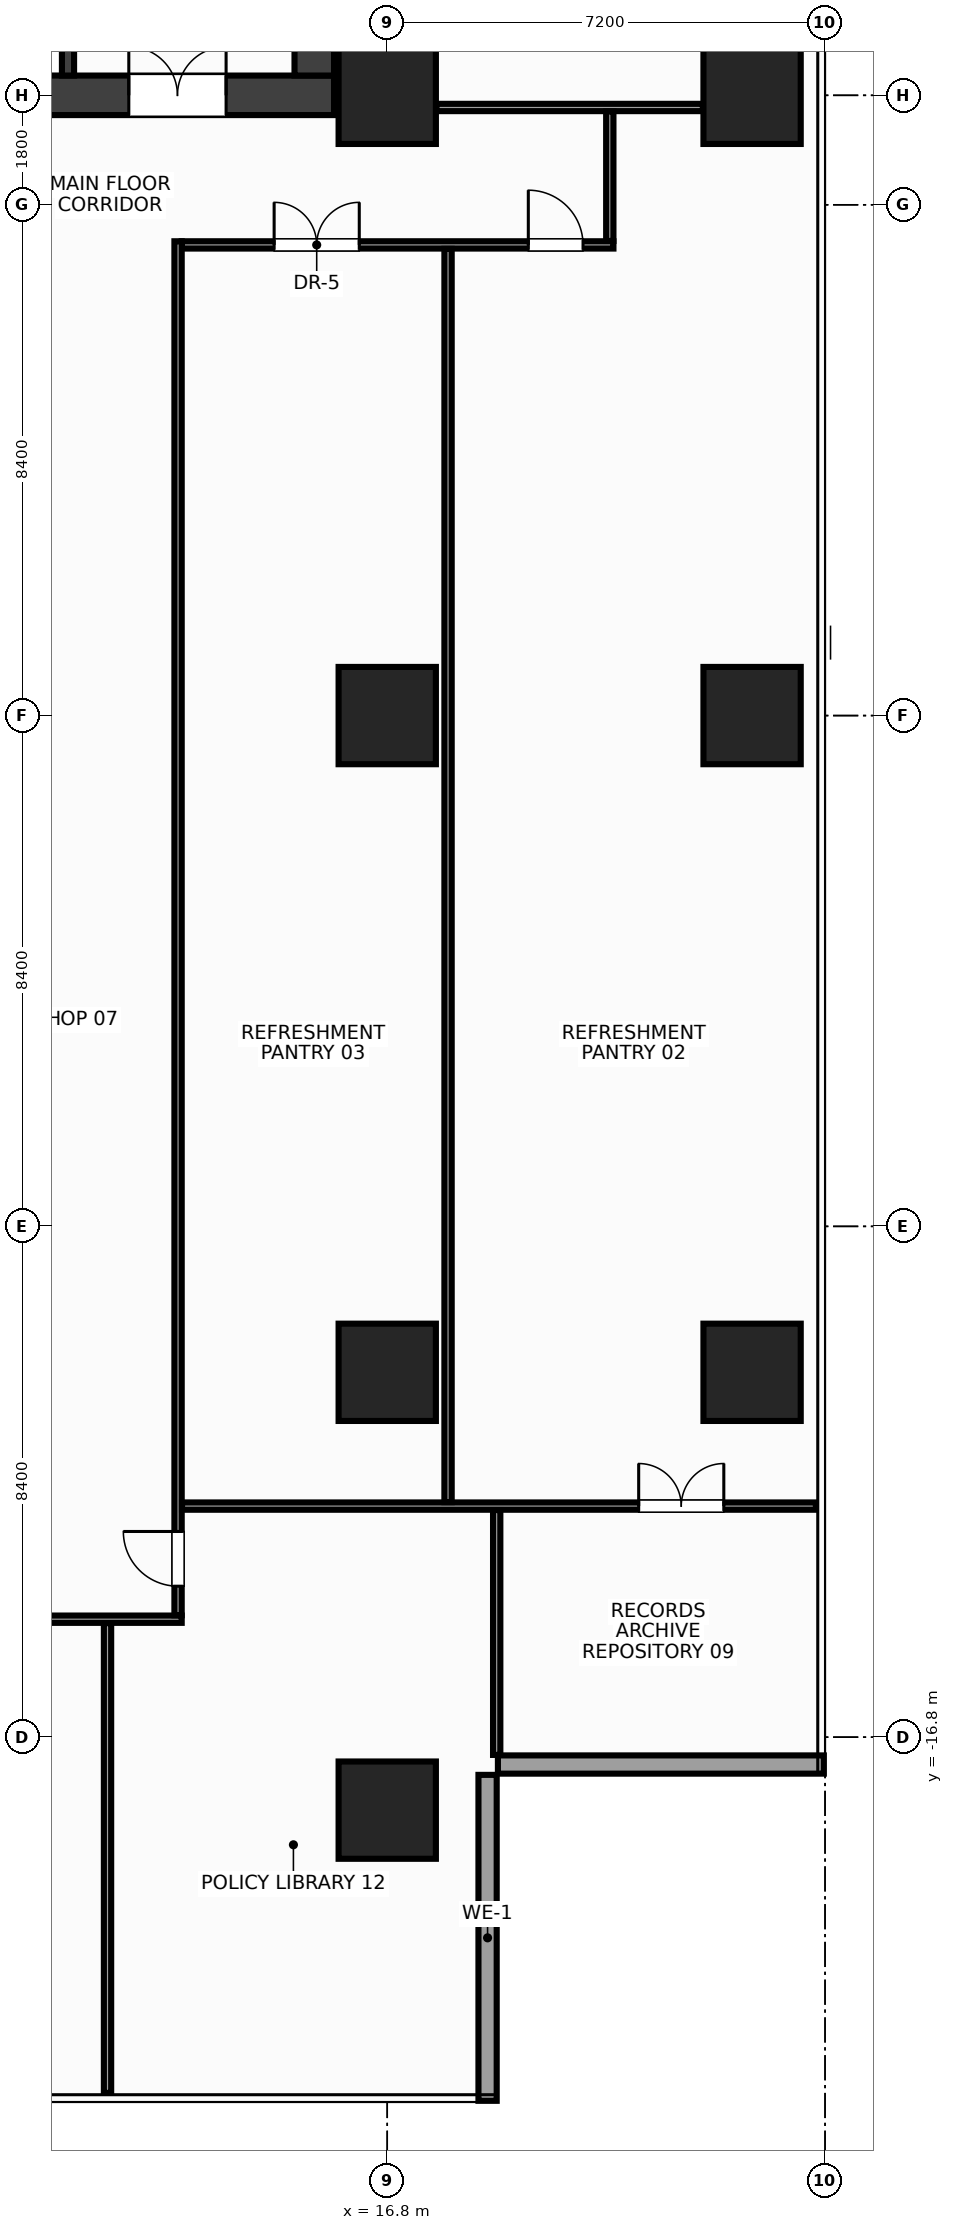
"""IFC4 building model, lengths in metres.
Left out: names, types, materials, properties, quantities, classifications, styles, units other than length and angle.
Written with IfcOpenShell. Run it as: python <this file> out.ifc"""

import sys

from ifc_helpers import new_model, si_unit, direction, frame, frame_2d, origin, origin_2d, place, context, subcontext, project, spatial, rectangle, extrude, source, transform, mapped, element, fill, save


model = new_model("IFC4")
c1 = context("Model", 3, precision=1e-05, world=origin(), true_north=direction((0.0, 1.0)))
c2 = subcontext(c1, "Body", "Model", "MODEL_VIEW")
j1 = project(units=[si_unit("LENGTHUNIT", "METRE"), si_unit("PLANEANGLEUNIT", "RADIAN")], contexts=[c1])
p1 = place(None, origin())
s1 = spatial("IfcSite", under=j1, at=p1, CompositionType="ELEMENT")
p2 = place(p1, origin())
s2 = spatial("IfcBuilding", under=s1, at=p2, CompositionType="ELEMENT")
p3 = place(p2, frame((0.0, 0.0, 185.6)))
s3 = spatial("IfcBuildingStorey", under=s2, at=p3, CompositionType="ELEMENT", Elevation=185.6)
m1 = source(origin(), c2, "Body", "SweptSolid", [
    extrude(rectangle(XDim=31.85, YDim=0.65, at=frame_2d((15.925, 0.0))), origin(), (0.0, 0.0, 1.0), 3.6),
])
p4 = place(p3, frame((-15.925, 10.2, 0.0), z_axis=(0.0, 0.0, 1.0), x_axis=(1.0, 0.0, 0.0)))
e1 = element("IfcWall", 1, at=p4, inside=s3, PredefinedType="SHEAR", context=c2, shape_type="MappedRepresentation", body=[
    mapped(m1, transform((0.0, 0.0, 0.0), x_axis=(1.0, 0.0, 0.0), y_axis=(0.0, 1.0, 0.0), z_axis=(0.0, 0.0, 1.0), scale=1.0)),
])
p5 = place(p4, frame((1.775, 0.0, 0.0)))
e2 = element("IfcOpeningElement", 2, at=p5, cuts=e1, PredefinedType="OPENING", context=c2, shape_type="SweptSolid", body=[
    extrude(rectangle(XDim=1.6, YDim=2.15, at=frame_2d((0.8, 1.075))), frame((0.0, 0.337, 0.0), z_axis=(0.0, -1.0, 0.0), x_axis=(1.0, 0.0, 0.0)), (0.0, 0.0, 1.0), 0.674),
])
p6 = place(p4, frame((28.475, 0.0, 0.0)))
e3 = element("IfcOpeningElement", 3, at=p6, cuts=e1, PredefinedType="OPENING", context=c2, shape_type="SweptSolid", body=[
    extrude(rectangle(XDim=1.6, YDim=2.15, at=frame_2d((0.8, 1.075))), frame((0.0, 0.337, 0.0), z_axis=(0.0, -1.0, 0.0), x_axis=(1.0, 0.0, 0.0)), (0.0, 0.0, 1.0), 0.674),
])
p7 = place(p4, frame((15.175, 0.0, 0.0)))
e4 = element("IfcOpeningElement", 4, at=p7, cuts=e1, PredefinedType="OPENING", context=c2, shape_type="SweptSolid", body=[
    extrude(rectangle(XDim=1.5, YDim=2.2, at=frame_2d((0.75, 1.1))), frame((0.0, 0.337, 0.0), z_axis=(0.0, -1.0, 0.0), x_axis=(1.0, 0.0, 0.0)), (0.0, 0.0, 1.0), 0.674),
])
m2 = source(origin(), c2, "Body", "SweptSolid", [
    extrude(rectangle(XDim=12.95, YDim=0.65, at=frame_2d((6.475, 0.0))), origin(), (0.0, 0.0, 1.0), 3.6),
])
p8 = place(p3, frame((15.6, 10.525, 0.0), z_axis=(0.0, 0.0, 1.0), x_axis=(0.0, 1.0, 0.0)))
e5 = element("IfcWall", 5, at=p8, inside=s3, PredefinedType="SHEAR", context=c2, shape_type="MappedRepresentation", body=[
    mapped(m2, transform((0.0, 0.0, 0.0), x_axis=(1.0, 0.0, 0.0), y_axis=(0.0, 1.0, 0.0), z_axis=(0.0, 0.0, 1.0), scale=1.0)),
])
m3 = source(origin(), c2, "Body", "SweptSolid", [
    extrude(rectangle(XDim=3.125, YDim=0.2, at=frame_2d((1.562, 0.0))), origin(), (0.0, 0.0, 1.0), 3.6),
])
p9 = place(p3, frame((11.55, 10.525, 0.0), z_axis=(0.0, 0.0, 1.0), x_axis=(0.0, 1.0, 0.0)))
e6 = element("IfcWall", 6, at=p9, inside=s3, PredefinedType="SHEAR", context=c2, shape_type="MappedRepresentation", body=[
    mapped(m3, transform((0.0, 0.0, 0.0), x_axis=(1.0, 0.0, 0.0), y_axis=(0.0, 1.0, 0.0), z_axis=(0.0, 0.0, 1.0), scale=1.0)),
])
p10 = place(p9, frame((0.9, 0.0, 0.0)))
e7 = element("IfcOpeningElement", 7, at=p10, cuts=e6, PredefinedType="OPENING", context=c2, shape_type="SweptSolid", body=[
    extrude(rectangle(XDim=1.1, YDim=2.15, at=frame_2d((0.55, 1.075))), frame((0.0, 0.112, 0.0), z_axis=(0.0, -1.0, 0.0), x_axis=(1.0, 0.0, 0.0)), (0.0, 0.0, 1.0), 0.224),
])
m4 = source(origin(), c2, "Body", "SweptSolid", [
    extrude(rectangle(XDim=1.6, YDim=1.6, at=origin_2d()), origin(), (0.0, 0.0, 1.0), 3.6),
])
for number, where, z_axis, x_axis in (
    (8, (16.8, -18.0, 0.0), (0.0, 0.0, 1.0), (1.0, 0.0, 0.0)),
    (9, (16.8, -10.8, 0.0), (0.0, 0.0, 1.0), (1.0, 0.0, 0.0)),
    (10, (16.8, 0.0, 0.0), (0.0, 0.0, 1.0), (1.0, 0.0, 0.0)),
    (11, (16.8, 10.2, 0.0), (0.0, 0.0, 1.0), (1.0, 0.0, 0.0)),
    (12, (22.8, -10.8, 0.0), (0.0, 0.0, 1.0), (1.0, 0.0, 0.0)),
    (13, (22.8, 0.0, 0.0), (0.0, 0.0, 1.0), (1.0, 0.0, 0.0)),
    (14, (22.8, 10.2, 0.0), (0.0, 0.0, 1.0), (1.0, 0.0, 0.0)),
):
    element("IfcColumn", number, at=place(p3, frame(where, z_axis=z_axis, x_axis=x_axis)), inside=s3, PredefinedType="COLUMN", context=c2, shape_type="MappedRepresentation", body=[
        mapped(m4, transform((0.0, 0.0, 0.0), x_axis=(1.0, 0.0, 0.0), y_axis=(0.0, 1.0, 0.0), z_axis=(0.0, 0.0, 1.0), scale=1.0)),
    ])
m5 = source(origin(), c2, "Body", "SweptSolid", [
    extrude(rectangle(XDim=5.36, YDim=0.3, at=frame_2d((2.68, 0.0))), origin(), (0.0, 0.0, 1.0), 2.68),
])
p11 = place(p3, frame((18.45, -22.78, 0.0), z_axis=(0.0, 0.0, 1.0), x_axis=(0.0, 1.0, 0.0)))
e15 = element("IfcWall", 15, at=p11, inside=s3, PredefinedType="STANDARD", context=c2, shape_type="MappedRepresentation", body=[
    mapped(m5, transform((0.0, 0.0, 0.0), x_axis=(1.0, 0.0, 0.0), y_axis=(0.0, 1.0, 0.0), z_axis=(0.0, 0.0, 1.0), scale=1.0)),
])
m6 = source(origin(), c2, "Body", "SweptSolid", [
    extrude(rectangle(XDim=5.36, YDim=0.3, at=frame_2d((2.68, 0.0))), origin(), (0.0, 0.0, 1.0), 2.68),
])
p12 = place(p3, frame((18.62, -17.25, 0.0), z_axis=(0.0, 0.0, 1.0), x_axis=(1.0, 0.0, 0.0)))
e16 = element("IfcWall", 16, at=p12, inside=s3, PredefinedType="STANDARD", context=c2, shape_type="MappedRepresentation", body=[
    mapped(m6, transform((0.0, 0.0, 0.0), x_axis=(1.0, 0.0, 0.0), y_axis=(0.0, 1.0, 0.0), z_axis=(0.0, 0.0, 1.0), scale=1.0)),
])
m7 = source(origin(), c2, "Body", "SweptSolid", [
    extrude(rectangle(XDim=4.38, YDim=0.12, at=frame_2d((2.19, 0.0))), origin(), (0.0, 0.0, 1.0), 2.835),
])
p13 = place(p3, frame((17.61, 10.0, 0.0), z_axis=(0.0, 0.0, 1.0), x_axis=(1.0, 0.0, 0.0)))
e17 = element("IfcWall", 17, at=p13, inside=s3, PredefinedType="PARTITIONING", context=c2, shape_type="MappedRepresentation", body=[
    mapped(m7, transform((0.0, 0.0, 0.0), x_axis=(1.0, 0.0, 0.0), y_axis=(0.0, 1.0, 0.0), z_axis=(0.0, 0.0, 1.0), scale=1.0)),
])
m8 = source(origin(), c2, "Body", "SweptSolid", [
    extrude(rectangle(XDim=7.1, YDim=0.12, at=frame_2d((3.55, 0.0))), origin(), (0.0, 0.0, 1.0), 2.685),
])
p14 = place(p3, frame((13.42, 7.74, 0.0), z_axis=(0.0, 0.0, 1.0), x_axis=(1.0, 0.0, 0.0)))
e18 = element("IfcWall", 18, at=p14, inside=s3, PredefinedType="PARTITIONING", context=c2, shape_type="MappedRepresentation", body=[
    mapped(m8, transform((0.0, 0.0, 0.0), x_axis=(1.0, 0.0, 0.0), y_axis=(0.0, 1.0, 0.0), z_axis=(0.0, 0.0, 1.0), scale=1.0)),
])
p15 = place(p14, frame((5.7, 0.0, 0.0)))
e19 = element("IfcOpeningElement", 19, at=p15, cuts=e18, PredefinedType="OPENING", context=c2, shape_type="SweptSolid", body=[
    extrude(rectangle(XDim=0.9, YDim=2.15, at=frame_2d((0.45, 1.075))), frame((0.0, 0.072, 0.0), z_axis=(0.0, -1.0, 0.0), x_axis=(1.0, 0.0, 0.0)), (0.0, 0.0, 1.0), 0.144),
])
p16 = place(p14, frame((1.52, 0.0, 0.0)))
e20 = element("IfcOpeningElement", 20, at=p16, cuts=e18, PredefinedType="OPENING", context=c2, shape_type="SweptSolid", body=[
    extrude(rectangle(XDim=1.4, YDim=2.2, at=frame_2d((0.7, 1.1))), frame((0.0, 0.072, 0.0), z_axis=(0.0, -1.0, 0.0), x_axis=(1.0, 0.0, 0.0)), (0.0, 0.0, 1.0), 0.144),
])
m9 = source(origin(), c2, "Body", "SweptSolid", [
    extrude(rectangle(XDim=2.34, YDim=0.12, at=frame_2d((1.17, 0.0))), origin(), (0.0, 0.0, 1.0), 3.3),
])
p17 = place(p3, frame((11.08, -14.86, 0.0), z_axis=(0.0, 0.0, 1.0), x_axis=(1.0, 0.0, 0.0)))
e21 = element("IfcWall", 21, at=p17, inside=s3, PredefinedType="PARTITIONING", context=c2, shape_type="MappedRepresentation", body=[
    mapped(m9, transform((0.0, 0.0, 0.0), x_axis=(1.0, 0.0, 0.0), y_axis=(0.0, 1.0, 0.0), z_axis=(0.0, 0.0, 1.0), scale=1.0)),
])
m10 = source(origin(), c2, "Body", "SweptSolid", [
    extrude(rectangle(XDim=2.13, YDim=0.12, at=frame_2d((1.065, 0.0))), origin(), (0.0, 0.0, 1.0), 3.3),
])
p18 = place(p3, frame((20.46, 7.805, 0.0), z_axis=(0.0, 0.0, 1.0), x_axis=(0.0, 1.0, 0.0)))
e22 = element("IfcWall", 22, at=p18, inside=s3, PredefinedType="PARTITIONING", context=c2, shape_type="MappedRepresentation", body=[
    mapped(m10, transform((0.0, 0.0, 0.0), x_axis=(1.0, 0.0, 0.0), y_axis=(0.0, 1.0, 0.0), z_axis=(0.0, 0.0, 1.0), scale=1.0)),
])
m11 = source(origin(), c2, "Body", "SweptSolid", [
    extrude(rectangle(XDim=22.595, YDim=0.12, at=frame_2d((11.297, 0.0))), origin(), (0.0, 0.0, 1.0), 2.585),
])
p19 = place(p3, frame((13.36, -14.795, 0.0), z_axis=(0.0, 0.0, 1.0), x_axis=(0.0, 1.0, 0.0)))
e23 = element("IfcWall", 23, at=p19, inside=s3, PredefinedType="PARTITIONING", context=c2, shape_type="MappedRepresentation", body=[
    mapped(m11, transform((0.0, 0.0, 0.0), x_axis=(1.0, 0.0, 0.0), y_axis=(0.0, 1.0, 0.0), z_axis=(0.0, 0.0, 1.0), scale=1.0)),
])
p20 = place(p19, frame((0.478, 0.0, 0.0)))
e24 = element("IfcOpeningElement", 24, at=p20, cuts=e23, PredefinedType="OPENING", context=c2, shape_type="SweptSolid", body=[
    extrude(rectangle(XDim=0.9, YDim=2.15, at=frame_2d((0.45, 1.075))), frame((0.0, 0.072, 0.0), z_axis=(0.0, -1.0, 0.0), x_axis=(1.0, 0.0, 0.0)), (0.0, 0.0, 1.0), 0.144),
])
m12 = source(origin(), c2, "Body", "SweptSolid", [
    extrude(rectangle(XDim=10.425, YDim=0.12, at=frame_2d((5.212, 0.0))), origin(), (0.0, 0.0, 1.0), 2.885),
])
p21 = place(p3, frame((13.425, -13.0, 0.0), z_axis=(0.0, 0.0, 1.0), x_axis=(1.0, 0.0, 0.0)))
e25 = element("IfcWall", 25, at=p21, inside=s3, PredefinedType="PARTITIONING", context=c2, shape_type="MappedRepresentation", body=[
    mapped(m12, transform((0.0, 0.0, 0.0), x_axis=(1.0, 0.0, 0.0), y_axis=(0.0, 1.0, 0.0), z_axis=(0.0, 0.0, 1.0), scale=1.0)),
])
p22 = place(p21, frame((7.51, 0.0, 0.0)))
e26 = element("IfcOpeningElement", 26, at=p22, cuts=e25, PredefinedType="OPENING", context=c2, shape_type="SweptSolid", body=[
    extrude(rectangle(XDim=1.4, YDim=2.2, at=frame_2d((0.7, 1.1))), frame((0.0, 0.072, 0.0), z_axis=(0.0, -1.0, 0.0), x_axis=(1.0, 0.0, 0.0)), (0.0, 0.0, 1.0), 0.144),
])
m13 = source(origin(), c2, "Body", "SweptSolid", [
    extrude(rectangle(XDim=20.61, YDim=0.12, at=frame_2d((10.305, 0.0))), origin(), (0.0, 0.0, 1.0), 2.835),
])
p23 = place(p3, frame((17.8, -12.935, 0.0), z_axis=(0.0, 0.0, 1.0), x_axis=(0.0, 1.0, 0.0)))
e27 = element("IfcWall", 27, at=p23, inside=s3, PredefinedType="PARTITIONING", context=c2, shape_type="MappedRepresentation", body=[
    mapped(m13, transform((0.0, 0.0, 0.0), x_axis=(1.0, 0.0, 0.0), y_axis=(0.0, 1.0, 0.0), z_axis=(0.0, 0.0, 1.0), scale=1.0)),
])
m14 = source(origin(), c2, "Body", "SweptSolid", [
    extrude(rectangle(XDim=7.725, YDim=0.12, at=frame_2d((3.862, 0.0))), origin(), (0.0, 0.0, 1.0), 2.835),
])
p24 = place(p3, frame((12.2, -22.65, 0.0), z_axis=(0.0, 0.0, 1.0), x_axis=(0.0, 1.0, 0.0)))
e28 = element("IfcWall", 28, at=p24, inside=s3, PredefinedType="PARTITIONING", context=c2, shape_type="MappedRepresentation", body=[
    mapped(m14, transform((0.0, 0.0, 0.0), x_axis=(1.0, 0.0, 0.0), y_axis=(0.0, 1.0, 0.0), z_axis=(0.0, 0.0, 1.0), scale=1.0)),
])
m15 = source(origin(), c2, "Body", "SweptSolid", [
    extrude(rectangle(XDim=4.027, YDim=0.12, at=frame_2d((2.014, 0.0))), origin(), (0.0, 0.0, 1.0), 3.3),
])
p25 = place(p3, frame((18.6, -17.092, 0.0), z_axis=(0.0, 0.0, 1.0), x_axis=(0.0, 1.0, 0.0)))
e29 = element("IfcWall", 29, at=p25, inside=s3, PredefinedType="PARTITIONING", context=c2, shape_type="MappedRepresentation", body=[
    mapped(m15, transform((0.0, 0.0, 0.0), x_axis=(1.0, 0.0, 0.0), y_axis=(0.0, 1.0, 0.0), z_axis=(0.0, 0.0, 1.0), scale=1.0)),
])
m16 = source(origin(), c2, "Body", "SweptSolid", [
    extrude(rectangle(XDim=1.6, YDim=2.15, at=frame_2d((0.8, 1.075))), frame((0.0, 0.025, 0.0), z_axis=(0.0, -1.0, 0.0), x_axis=(1.0, 0.0, 0.0)), (0.0, 0.0, 1.0), 0.05),
])
p26 = place(p6, origin())
e30 = element("IfcDoor", 30, at=p26, inside=s3, OperationType="DOUBLE_DOOR_SINGLE_SWING", PredefinedType="DOOR", context=c2, shape_type="MappedRepresentation", body=[
    mapped(m16, transform((0.0, 0.0, 0.0), x_axis=(1.0, 0.0, 0.0), y_axis=(0.0, 1.0, 0.0), z_axis=(0.0, 0.0, 1.0), scale=1.0)),
])
fill(e3, e30)
m17 = source(origin(), c2, "Body", "SweptSolid", [
    extrude(rectangle(XDim=0.9, YDim=2.15, at=frame_2d((0.45, 1.075))), frame((0.0, 0.025, 0.0), z_axis=(0.0, -1.0, 0.0), x_axis=(1.0, 0.0, 0.0)), (0.0, 0.0, 1.0), 0.05),
])
p27 = place(p15, origin())
e31 = element("IfcDoor", 31, at=p27, inside=s3, OperationType="SINGLE_SWING_LEFT", PredefinedType="DOOR", context=c2, shape_type="MappedRepresentation", body=[
    mapped(m17, transform((0.0, 0.0, 0.0), x_axis=(1.0, 0.0, 0.0), y_axis=(0.0, 1.0, 0.0), z_axis=(0.0, 0.0, 1.0), scale=1.0)),
])
fill(e19, e31)
m18 = source(origin(), c2, "Body", "SweptSolid", [
    extrude(rectangle(XDim=1.4, YDim=2.2, at=frame_2d((0.7, 1.1))), frame((0.0, 0.025, 0.0), z_axis=(0.0, -1.0, 0.0), x_axis=(1.0, 0.0, 0.0)), (0.0, 0.0, 1.0), 0.05),
])
p28 = place(p16, origin())
e32 = element("IfcDoor", 32, at=p28, inside=s3, OperationType="DOUBLE_DOOR_SINGLE_SWING", PredefinedType="DOOR", context=c2, shape_type="MappedRepresentation", body=[
    mapped(m18, transform((0.0, 0.0, 0.0), x_axis=(1.0, 0.0, 0.0), y_axis=(0.0, 1.0, 0.0), z_axis=(0.0, 0.0, 1.0), scale=1.0)),
])
fill(e20, e32)
p29 = place(p20, origin())
e33 = element("IfcDoor", 33, at=p29, inside=s3, OperationType="SINGLE_SWING_RIGHT", PredefinedType="DOOR", context=c2, shape_type="MappedRepresentation", body=[
    mapped(m17, transform((0.0, 0.0, 0.0), x_axis=(1.0, 0.0, 0.0), y_axis=(0.0, 1.0, 0.0), z_axis=(0.0, 0.0, 1.0), scale=1.0)),
])
fill(e24, e33)
p30 = place(p22, origin())
e34 = element("IfcDoor", 34, at=p30, inside=s3, OperationType="DOUBLE_DOOR_SINGLE_SWING", PredefinedType="DOOR", context=c2, shape_type="MappedRepresentation", body=[
    mapped(m18, transform((0.0, 0.0, 0.0), x_axis=(1.0, 0.0, 0.0), y_axis=(0.0, 1.0, 0.0), z_axis=(0.0, 0.0, 1.0), scale=1.0)),
])
fill(e26, e34)
save(model, sys.argv[1])
